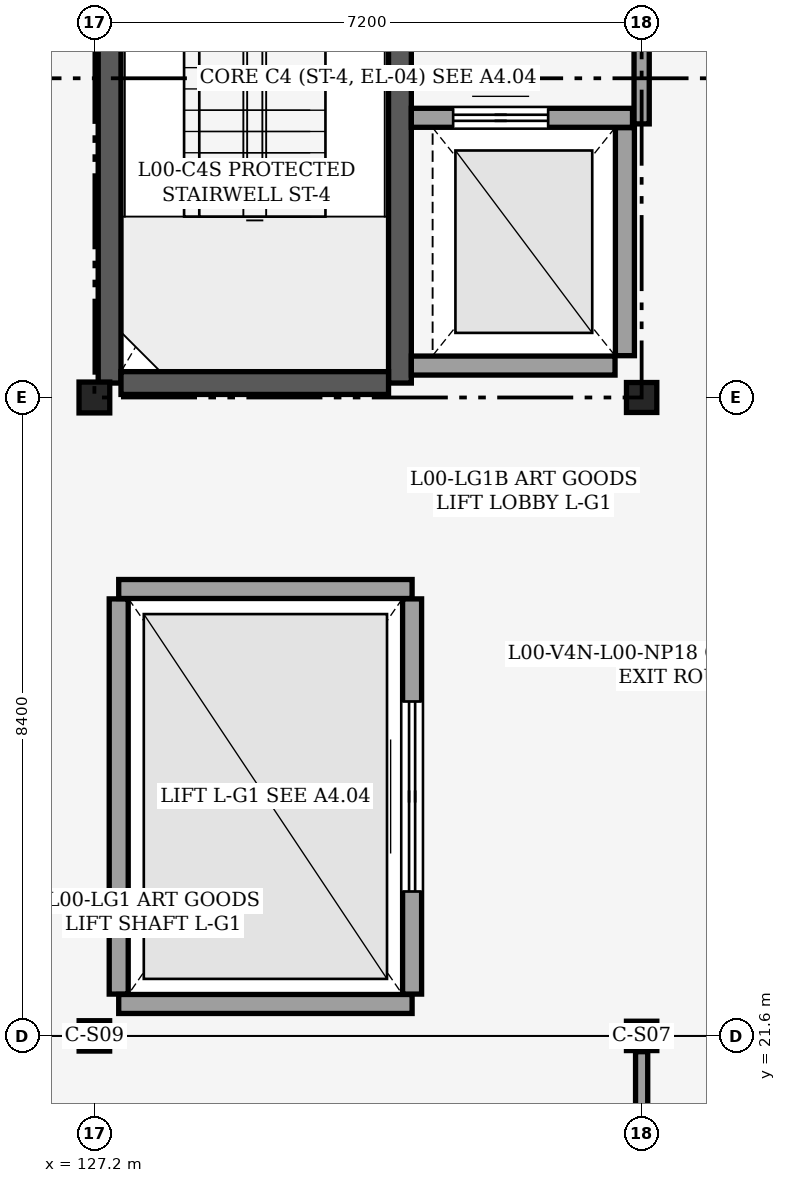
"""IFC4 building model, lengths in metres.
Left out: names, types, materials, properties, quantities, classifications, styles, units other than length and angle.
Written with IfcOpenShell. Run it as: python <this file> out.ifc"""

import sys

from ifc_helpers import new_model, si_unit, direction, frame, frame_2d, origin, origin_2d, place, context, subcontext, project, spatial, rectangle, i_section, extrude, element, fill, save


model = new_model("IFC4")
c1 = context("Model", 3, precision=1e-05, world=origin(), true_north=direction((0.0, 1.0)))
c2 = subcontext(c1, "Body", "Model", "MODEL_VIEW")
j1 = project(units=[si_unit("LENGTHUNIT", "METRE"), si_unit("PLANEANGLEUNIT", "RADIAN")], contexts=[c1])
p1 = place(None, origin())
s1 = spatial("IfcSite", under=j1, at=p1, CompositionType="ELEMENT")
p2 = place(p1, origin())
s2 = spatial("IfcBuilding", under=s1, at=p2, CompositionType="ELEMENT")
p3 = place(p2, origin())
s3 = spatial("IfcBuildingStorey", under=s2, at=p3, CompositionType="ELEMENT", Elevation=0.0)
p4 = place(p3, frame((127.2, 21.6, 0.0), z_axis=(0.0, 0.0, 1.0), x_axis=(1.0, 0.0, 0.0)))
e1 = element("IfcColumn", 1, at=p4, inside=s3, PredefinedType="COLUMN", context=c2, shape_type="SweptSolid", body=[
    extrude(i_section(OverallWidth=0.401, OverallDepth=0.399, WebThickness=0.025, FlangeThickness=0.04, FilletRadius=0.025, at=origin_2d()), origin(), (0.0, 0.0, 1.0), 5.4),
])
p5 = place(p3, frame((127.2, 30.0, 0.0), z_axis=(0.0, 0.0, 1.0), x_axis=(1.0, 0.0, 0.0)))
e2 = element("IfcColumn", 2, at=p5, inside=s3, PredefinedType="COLUMN", context=c2, shape_type="SweptSolid", body=[
    extrude(i_section(OverallWidth=0.404, OverallDepth=0.406, WebThickness=0.027, FlangeThickness=0.044, FilletRadius=0.025, at=origin_2d()), origin(), (0.0, 0.0, 1.0), 5.4),
])
p6 = place(p3, frame((134.4, 21.6, 0.0), z_axis=(0.0, 0.0, 1.0), x_axis=(1.0, 0.0, 0.0)))
e3 = element("IfcColumn", 3, at=p6, inside=s3, PredefinedType="COLUMN", context=c2, shape_type="SweptSolid", body=[
    extrude(i_section(OverallWidth=0.399, OverallDepth=0.386, WebThickness=0.021, FlangeThickness=0.033, FilletRadius=0.025, at=origin_2d()), origin(), (0.0, 0.0, 1.0), 5.4),
])
p7 = place(p3, frame((134.4, 30.0, 0.0), z_axis=(0.0, 0.0, 1.0), x_axis=(1.0, 0.0, 0.0)))
e4 = element("IfcColumn", 4, at=p7, inside=s3, PredefinedType="COLUMN", context=c2, shape_type="SweptSolid", body=[
    extrude(i_section(OverallWidth=0.399, OverallDepth=0.394, WebThickness=0.023, FlangeThickness=0.037, FilletRadius=0.025, at=origin_2d()), origin(), (0.0, 0.0, 1.0), 5.4),
])
p8 = place(p3, frame((127.4, 30.19, 0.0), z_axis=(0.0, 0.0, 1.0), x_axis=(0.0, 1.0, 0.0)))
e5 = element("IfcWall", 5, at=p8, inside=s3, PredefinedType="SHEAR", context=c2, shape_type="SweptSolid", body=[
    extrude(rectangle(XDim=8.02, YDim=0.3, at=frame_2d((4.01, 0.0))), origin(), (0.0, 0.0, 1.0), 5.16),
])
p9 = place(p3, frame((131.22, 30.19, 0.0), z_axis=(0.0, 0.0, 1.0), x_axis=(0.0, 1.0, 0.0)))
e6 = element("IfcWall", 6, at=p9, inside=s3, PredefinedType="SHEAR", context=c2, shape_type="SweptSolid", body=[
    extrude(rectangle(XDim=8.02, YDim=0.3, at=frame_2d((4.01, 0.0))), origin(), (0.0, 0.0, 1.0), 5.16),
])
p10 = place(p9, frame((6.47, 0.0, 0.0)))
e7 = element("IfcOpeningElement", 7, at=p10, cuts=e6, PredefinedType="OPENING", context=c2, shape_type="SweptSolid", body=[
    extrude(rectangle(XDim=1.1, YDim=2.15, at=frame_2d((0.55, 1.075))), frame((0.0, 0.16, 0.0), z_axis=(0.0, -1.0, 0.0), x_axis=(1.0, 0.0, 0.0)), (0.0, 0.0, 1.0), 0.321),
])
p11 = place(p3, frame((127.55, 30.19, 0.0), z_axis=(0.0, 0.0, 1.0), x_axis=(1.0, 0.0, 0.0)))
e8 = element("IfcWall", 8, at=p11, inside=s3, PredefinedType="SHEAR", context=c2, shape_type="SweptSolid", body=[
    extrude(rectangle(XDim=3.52, YDim=0.3, at=frame_2d((1.76, 0.0))), origin(), (0.0, 0.0, 1.0), 5.16),
])
p12 = place(p3, frame((131.37, 30.42, 0.0), z_axis=(0.0, 0.0, 1.0), x_axis=(1.0, 0.0, 0.0)))
e9 = element("IfcWall", 9, at=p12, inside=s3, PredefinedType="PARTITIONING", context=c2, shape_type="SweptSolid", body=[
    extrude(rectangle(XDim=2.68, YDim=0.25, at=frame_2d((1.34, 0.0))), origin(), (0.0, 0.0, 1.0), 5.16),
])
p13 = place(p3, frame((134.18, 30.55, 0.0), z_axis=(0.0, 0.0, 1.0), x_axis=(0.0, 1.0, 0.0)))
e10 = element("IfcWall", 10, at=p13, inside=s3, PredefinedType="PARTITIONING", context=c2, shape_type="SweptSolid", body=[
    extrude(rectangle(XDim=3.0, YDim=0.25, at=frame_2d((1.5, 0.0))), origin(), (0.0, 0.0, 1.0), 4.447),
])
p14 = place(p3, frame((131.37, 33.68, 0.0), z_axis=(0.0, 0.0, 1.0), x_axis=(1.0, 0.0, 0.0)))
e11 = element("IfcWall", 11, at=p14, inside=s3, PredefinedType="PARTITIONING", context=c2, shape_type="SweptSolid", body=[
    extrude(rectangle(XDim=2.91, YDim=0.25, at=frame_2d((1.455, 0.0))), origin(), (0.0, 0.0, 1.0), 5.16),
])
p15 = place(p14, frame((0.55, 0.0, 0.0)))
e12 = element("IfcOpeningElement", 12, at=p15, cuts=e11, PredefinedType="OPENING", context=c2, shape_type="SweptSolid", body=[
    extrude(rectangle(XDim=1.25, YDim=2.15, at=frame_2d((0.625, 1.075))), frame((0.0, 0.135, 0.0), z_axis=(0.0, -1.0, 0.0), x_axis=(1.0, 0.0, 0.0)), (0.0, 0.0, 1.0), 0.271),
])
p16 = place(p3, frame((134.4, 33.6, 0.0), z_axis=(0.0, 0.0, 1.0), x_axis=(0.0, 1.0, 0.0)))
e13 = element("IfcWall", 13, at=p16, inside=s3, PredefinedType="PARTITIONING", context=c2, shape_type="SweptSolid", body=[
    extrude(rectangle(XDim=4.58, YDim=0.2, at=frame_2d((2.29, 0.0))), origin(), (0.0, 0.0, 1.0), 4.447),
])
p17 = place(p3, frame((127.52, 22.15, 0.0), z_axis=(0.0, 0.0, 1.0), x_axis=(0.0, 1.0, 0.0)))
e14 = element("IfcWall", 14, at=p17, inside=s3, PredefinedType="PARTITIONING", context=c2, shape_type="SweptSolid", body=[
    extrude(rectangle(XDim=5.2, YDim=0.25, at=frame_2d((2.6, 0.0))), origin(), (0.0, 0.0, 1.0), 4.284),
])
for number, where, z_axis, x_axis in (
    (15, (127.52, 27.48, 0.0), (0.0, 0.0, 1.0), (1.0, 0.0, 0.0)),
    (16, (127.52, 22.02, 0.0), (0.0, 0.0, 1.0), (1.0, 0.0, 0.0)),
):
    element("IfcWall", number, at=place(p3, frame(where, z_axis=z_axis, x_axis=x_axis)), inside=s3, PredefinedType="PARTITIONING", context=c2, shape_type="SweptSolid", body=[
        extrude(rectangle(XDim=3.86, YDim=0.25, at=frame_2d((1.93, 0.0))), origin(), (0.0, 0.0, 1.0), 5.16),
    ])
p18 = place(p3, frame((131.38, 22.15, 0.0), z_axis=(0.0, 0.0, 1.0), x_axis=(0.0, 1.0, 0.0)))
e17 = element("IfcWall", 17, at=p18, inside=s3, PredefinedType="PARTITIONING", context=c2, shape_type="SweptSolid", body=[
    extrude(rectangle(XDim=5.2, YDim=0.25, at=frame_2d((2.6, 0.0))), origin(), (0.0, 0.0, 1.0), 5.16),
])
p19 = place(p18, frame((1.35, 0.0, 0.0)))
e18 = element("IfcOpeningElement", 18, at=p19, cuts=e17, PredefinedType="OPENING", context=c2, shape_type="SweptSolid", body=[
    extrude(rectangle(XDim=2.5, YDim=2.6, at=frame_2d((1.25, 1.3))), frame((0.0, 0.135, 0.0), z_axis=(0.0, -1.0, 0.0), x_axis=(1.0, 0.0, 0.0)), (0.0, 0.0, 1.0), 0.271),
])
p20 = place(p3, frame((134.4, 14.605, 0.0), z_axis=(0.0, 0.0, 1.0), x_axis=(0.0, 1.0, 0.0)))
e19 = element("IfcWall", 19, at=p20, inside=s3, PredefinedType="PARTITIONING", context=c2, shape_type="SweptSolid", body=[
    extrude(rectangle(XDim=6.787, YDim=0.16, at=frame_2d((3.393, 0.0))), origin(), (0.0, 0.0, 1.0), 4.533),
])
p21 = place(p15, origin())
e20 = element("IfcDoor", 20, at=p21, inside=s3, OperationType="DOUBLE_DOOR_SLIDING", PredefinedType="DOOR", context=c2, shape_type="SweptSolid", body=[
    extrude(rectangle(XDim=1.25, YDim=2.15, at=frame_2d((0.625, 1.075))), frame((0.0, 0.025, 0.0), z_axis=(0.0, -1.0, 0.0), x_axis=(1.0, 0.0, 0.0)), (0.0, 0.0, 1.0), 0.05),
])
fill(e12, e20)
p22 = place(p19, origin())
e21 = element("IfcDoor", 21, at=p22, inside=s3, OperationType="DOUBLE_DOOR_SLIDING", PredefinedType="DOOR", context=c2, shape_type="SweptSolid", body=[
    extrude(rectangle(XDim=2.5, YDim=2.6, at=frame_2d((1.25, 1.3))), frame((0.0, 0.025, 0.0), z_axis=(0.0, -1.0, 0.0), x_axis=(1.0, 0.0, 0.0)), (0.0, 0.0, 1.0), 0.05),
])
fill(e18, e21)
save(model, sys.argv[1])
